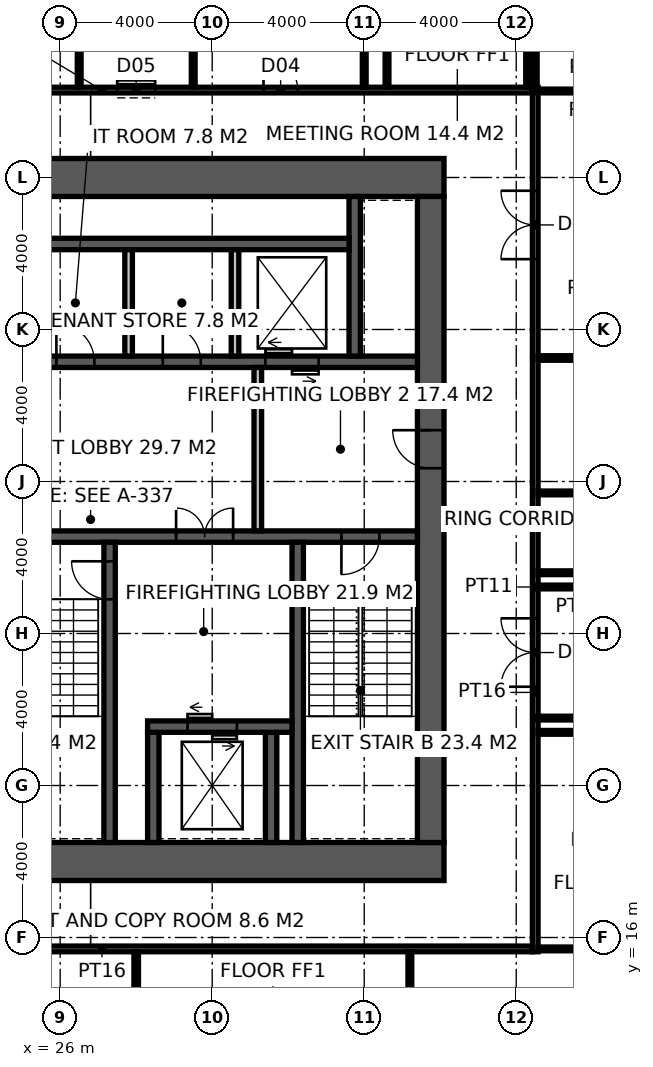
"""IFC4 building model, lengths in metres.
Left out: names, types, materials, properties, quantities, classifications, styles, units other than length and angle.
Written with IfcOpenShell. Run it as: python <this file> out.ifc"""

import sys

from ifc_helpers import new_model, si_unit, direction, frame, frame_2d, origin, place, context, subcontext, project, spatial, rectangle, extrude, element, fill, save


model = new_model("IFC4")
c1 = context("Model", 3, precision=1e-05, world=origin(), true_north=direction((0.0, 1.0)))
c2 = subcontext(c1, "Body", "Model", "MODEL_VIEW")
j1 = project(units=[si_unit("LENGTHUNIT", "METRE"), si_unit("PLANEANGLEUNIT", "RADIAN")], contexts=[c1])
p1 = place(None, origin())
s1 = spatial("IfcSite", under=j1, at=p1, CompositionType="ELEMENT")
p2 = place(p1, origin())
s2 = spatial("IfcBuilding", under=s1, at=p2, CompositionType="ELEMENT")
p3 = place(p2, frame((0.0, 0.0, 226.2)))
s3 = spatial("IfcBuildingStorey", under=s2, at=p3, CompositionType="ELEMENT", Elevation=226.2)
p4 = place(p3, frame((18.5, 18.0, -0.15), z_axis=(0.0, 0.0, 1.0), x_axis=(1.0, 0.0, 0.0)))
e1 = element("IfcWall", 1, at=p4, inside=s3, PredefinedType="SHEAR", context=c2, shape_type="SweptSolid", body=[
    extrude(rectangle(XDim=17.6, YDim=1.0, at=frame_2d((8.8, 0.0))), origin(), (0.0, 0.0, 1.0), 4.0),
])
p5 = place(p4, frame((3.45, 0.0, 0.15)))
e2 = element("IfcOpeningElement", 2, at=p5, cuts=e1, PredefinedType="OPENING", context=c2, shape_type="SweptSolid", body=[
    extrude(rectangle(XDim=1.5, YDim=2.4, at=frame_2d((0.75, 1.2))), frame((0.0, 0.51, 0.0), z_axis=(0.0, -1.0, 0.0), x_axis=(1.0, 0.0, 0.0)), (0.0, 0.0, 1.0), 1.02),
])
p6 = place(p3, frame((18.5, 36.0, -0.15), z_axis=(0.0, 0.0, 1.0), x_axis=(1.0, 0.0, 0.0)))
e3 = element("IfcWall", 3, at=p6, inside=s3, PredefinedType="SHEAR", context=c2, shape_type="SweptSolid", body=[
    extrude(rectangle(XDim=17.6, YDim=1.0, at=frame_2d((8.8, 0.0))), origin(), (0.0, 0.0, 1.0), 4.0),
])
p7 = place(p3, frame((35.75, 18.5, -0.15), z_axis=(0.0, 0.0, 1.0), x_axis=(0.0, 1.0, 0.0)))
e4 = element("IfcWall", 4, at=p7, inside=s3, PredefinedType="SHEAR", context=c2, shape_type="SweptSolid", body=[
    extrude(rectangle(XDim=17.0, YDim=0.7, at=frame_2d((8.5, 0.0))), origin(), (0.0, 0.0, 1.0), 4.0),
])
p8 = place(p7, frame((9.85, 0.0, 0.15)))
e5 = element("IfcOpeningElement", 5, at=p8, cuts=e4, PredefinedType="OPENING", context=c2, shape_type="SweptSolid", body=[
    extrude(rectangle(XDim=1.0, YDim=2.2, at=frame_2d((0.5, 1.1))), frame((0.0, 0.36, 0.0), z_axis=(0.0, -1.0, 0.0), x_axis=(1.0, 0.0, 0.0)), (0.0, 0.0, 1.0), 0.72),
])
p9 = place(p3, frame((24.15, 26.55, -0.15), z_axis=(0.0, 0.0, 1.0), x_axis=(1.0, 0.0, 0.0)))
e6 = element("IfcWall", 6, at=p9, inside=s3, PredefinedType="SHEAR", context=c2, shape_type="SweptSolid", body=[
    extrude(rectangle(XDim=11.25, YDim=0.3, at=frame_2d((5.625, 0.0))), origin(), (0.0, 0.0, 1.0), 4.0),
])
p10 = place(p9, frame((9.25, 0.0, 0.15)))
e7 = element("IfcOpeningElement", 7, at=p10, cuts=e6, PredefinedType="OPENING", context=c2, shape_type="SweptSolid", body=[
    extrude(rectangle(XDim=1.0, YDim=2.2, at=frame_2d((0.5, 1.1))), frame((0.0, 0.16, 0.0), z_axis=(0.0, -1.0, 0.0), x_axis=(1.0, 0.0, 0.0)), (0.0, 0.0, 1.0), 0.32),
])
p11 = place(p9, frame((4.9, 0.0, 0.15)))
e8 = element("IfcOpeningElement", 8, at=p11, cuts=e6, PredefinedType="OPENING", context=c2, shape_type="SweptSolid", body=[
    extrude(rectangle(XDim=1.5, YDim=2.4, at=frame_2d((0.75, 1.2))), frame((0.0, 0.16, 0.0), z_axis=(0.0, -1.0, 0.0), x_axis=(1.0, 0.0, 0.0)), (0.0, 0.0, 1.0), 0.32),
])
p12 = place(p3, frame((27.3, 18.5, -0.15), z_axis=(0.0, 0.0, 1.0), x_axis=(0.0, 1.0, 0.0)))
e9 = element("IfcWall", 9, at=p12, inside=s3, PredefinedType="SHEAR", context=c2, shape_type="SweptSolid", body=[
    extrude(rectangle(XDim=7.9, YDim=0.3, at=frame_2d((3.95, 0.0))), origin(), (0.0, 0.0, 1.0), 4.0),
])
p13 = place(p12, frame((6.4, 0.0, 0.15)))
e10 = element("IfcOpeningElement", 10, at=p13, cuts=e9, PredefinedType="OPENING", context=c2, shape_type="SweptSolid", body=[
    extrude(rectangle(XDim=1.0, YDim=2.2, at=frame_2d((0.5, 1.1))), frame((0.0, 0.16, 0.0), z_axis=(0.0, -1.0, 0.0), x_axis=(1.0, 0.0, 0.0)), (0.0, 0.0, 1.0), 0.32),
])
p14 = place(p3, frame((32.25, 18.5, -0.15), z_axis=(0.0, 0.0, 1.0), x_axis=(0.0, 1.0, 0.0)))
e11 = element("IfcWall", 11, at=p14, inside=s3, PredefinedType="SHEAR", context=c2, shape_type="SweptSolid", body=[
    extrude(rectangle(XDim=7.9, YDim=0.3, at=frame_2d((3.95, 0.0))), origin(), (0.0, 0.0, 1.0), 4.0),
])
for number, where, z_axis, x_axis in (
    (12, (28.45, 18.5, -0.15), (0.0, 0.0, 1.0), (0.0, 1.0, 0.0)),
    (13, (31.55, 18.5, -0.15), (0.0, 0.0, 1.0), (0.0, 1.0, 0.0)),
):
    element("IfcWall", number, at=place(p3, frame(where, z_axis=z_axis, x_axis=x_axis)), inside=s3, PredefinedType="SHEAR", context=c2, shape_type="SweptSolid", body=[
        extrude(rectangle(XDim=2.9, YDim=0.3, at=frame_2d((1.45, 0.0))), origin(), (0.0, 0.0, 1.0), 4.0),
    ])
p15 = place(p3, frame((28.3, 21.55, -0.15), z_axis=(0.0, 0.0, 1.0), x_axis=(1.0, 0.0, 0.0)))
e14 = element("IfcWall", 14, at=p15, inside=s3, PredefinedType="SHEAR", context=c2, shape_type="SweptSolid", body=[
    extrude(rectangle(XDim=3.8, YDim=0.3, at=frame_2d((1.9, 0.0))), origin(), (0.0, 0.0, 1.0), 4.0),
])
p16 = place(p15, frame((1.05, 0.0, 0.15)))
e15 = element("IfcOpeningElement", 15, at=p16, cuts=e14, PredefinedType="OPENING", context=c2, shape_type="SweptSolid", body=[
    extrude(rectangle(XDim=1.3, YDim=2.4, at=frame_2d((0.65, 1.2))), frame((0.0, 0.16, 0.0), z_axis=(0.0, -1.0, 0.0), x_axis=(1.0, 0.0, 0.0)), (0.0, 0.0, 1.0), 0.32),
])
p17 = place(p3, frame((24.15, 31.15, -0.15), z_axis=(0.0, 0.0, 1.0), x_axis=(1.0, 0.0, 0.0)))
e16 = element("IfcWall", 16, at=p17, inside=s3, PredefinedType="SHEAR", context=c2, shape_type="SweptSolid", body=[
    extrude(rectangle(XDim=11.25, YDim=0.3, at=frame_2d((5.625, 0.0))), origin(), (0.0, 0.0, 1.0), 4.0),
])
p18 = place(p17, frame((1.75, 0.0, 0.15)))
e17 = element("IfcOpeningElement", 17, at=p18, cuts=e16, PredefinedType="OPENING", context=c2, shape_type="SweptSolid", body=[
    extrude(rectangle(XDim=1.0, YDim=2.2, at=frame_2d((0.5, 1.1))), frame((0.0, 0.16, 0.0), z_axis=(0.0, -1.0, 0.0), x_axis=(1.0, 0.0, 0.0)), (0.0, 0.0, 1.0), 0.32),
])
p19 = place(p17, frame((4.55, 0.0, 0.15)))
e18 = element("IfcOpeningElement", 18, at=p19, cuts=e16, PredefinedType="OPENING", context=c2, shape_type="SweptSolid", body=[
    extrude(rectangle(XDim=1.0, YDim=2.2, at=frame_2d((0.5, 1.1))), frame((0.0, 0.16, 0.0), z_axis=(0.0, -1.0, 0.0), x_axis=(1.0, 0.0, 0.0)), (0.0, 0.0, 1.0), 0.32),
])
p20 = place(p17, frame((7.25, 0.0, 0.15)))
e19 = element("IfcOpeningElement", 19, at=p20, cuts=e16, PredefinedType="OPENING", context=c2, shape_type="SweptSolid", body=[
    extrude(rectangle(XDim=1.4, YDim=2.4, at=frame_2d((0.7, 1.2))), frame((0.0, 0.16, 0.0), z_axis=(0.0, -1.0, 0.0), x_axis=(1.0, 0.0, 0.0)), (0.0, 0.0, 1.0), 0.32),
])
p21 = place(p3, frame((33.75, 31.3, -0.15), z_axis=(0.0, 0.0, 1.0), x_axis=(0.0, 1.0, 0.0)))
e20 = element("IfcWall", 20, at=p21, inside=s3, PredefinedType="SHEAR", context=c2, shape_type="SweptSolid", body=[
    extrude(rectangle(XDim=4.2, YDim=0.3, at=frame_2d((2.1, 0.0))), origin(), (0.0, 0.0, 1.0), 4.0),
])
p22 = place(p3, frame((25.0, 34.25, -0.15), z_axis=(0.0, 0.0, 1.0), x_axis=(1.0, 0.0, 0.0)))
e21 = element("IfcWall", 21, at=p22, inside=s3, PredefinedType="SHEAR", context=c2, shape_type="SweptSolid", body=[
    extrude(rectangle(XDim=8.6, YDim=0.3, at=frame_2d((4.3, 0.0))), origin(), (0.0, 0.0, 1.0), 4.0),
])
p23 = place(p3, frame((27.8, 31.3, 0.0), z_axis=(0.0, 0.0, 1.0), x_axis=(0.0, 1.0, 0.0)))
e22 = element("IfcWall", 22, at=p23, inside=s3, PredefinedType="SOLIDWALL", context=c2, shape_type="SweptSolid", body=[
    extrude(rectangle(XDim=2.8, YDim=0.2, at=frame_2d((1.4, 0.0))), origin(), (0.0, 0.0, 1.0), 3.85),
])
p24 = place(p3, frame((30.6, 31.3, -0.15), z_axis=(0.0, 0.0, 1.0), x_axis=(0.0, 1.0, 0.0)))
e23 = element("IfcWall", 23, at=p24, inside=s3, PredefinedType="SOLIDWALL", context=c2, shape_type="SweptSolid", body=[
    extrude(rectangle(XDim=2.8, YDim=0.2, at=frame_2d((1.4, 0.0))), origin(), (0.0, 0.0, 1.0), 4.0),
])
p25 = place(p3, frame((31.2, 26.7, 0.0), z_axis=(0.0, 0.0, 1.0), x_axis=(0.0, 1.0, 0.0)))
e24 = element("IfcWall", 24, at=p25, inside=s3, PredefinedType="SOLIDWALL", context=c2, shape_type="SweptSolid", body=[
    extrude(rectangle(XDim=4.3, YDim=0.2, at=frame_2d((2.15, 0.0))), origin(), (0.0, 0.0, 1.0), 3.85),
])
p26 = place(p3, frame((38.5, 15.625, 0.0), z_axis=(0.0, 0.0, 1.0), x_axis=(0.0, 1.0, 0.0)))
e25 = element("IfcWall", 25, at=p26, inside=s3, PredefinedType="PARTITIONING", context=c2, shape_type="SweptSolid", body=[
    extrude(rectangle(XDim=22.75, YDim=0.15, at=frame_2d((11.375, 0.0))), origin(), (0.0, 0.0, 1.0), 3.85),
])
p27 = place(p26, frame((6.974, 0.0, 0.0)))
e26 = element("IfcOpeningElement", 26, at=p27, cuts=e25, PredefinedType="OPENING", context=c2, shape_type="SweptSolid", body=[
    extrude(rectangle(XDim=1.8, YDim=2.4, at=frame_2d((0.9, 1.2))), frame((0.0, 0.085, 0.0), z_axis=(0.0, -1.0, 0.0), x_axis=(1.0, 0.0, 0.0)), (0.0, 0.0, 1.0), 0.17),
])
p28 = place(p26, frame((18.226, 0.0, 0.0)))
e27 = element("IfcOpeningElement", 27, at=p28, cuts=e25, PredefinedType="OPENING", context=c2, shape_type="SweptSolid", body=[
    extrude(rectangle(XDim=1.8, YDim=2.4, at=frame_2d((0.9, 1.2))), frame((0.0, 0.085, 0.0), z_axis=(0.0, -1.0, 0.0), x_axis=(1.0, 0.0, 0.0)), (0.0, 0.0, 1.0), 0.17),
])
p29 = place(p3, frame((15.775, 15.7, 0.0), z_axis=(0.0, 0.0, 1.0), x_axis=(1.0, 0.0, 0.0)))
e28 = element("IfcWall", 28, at=p29, inside=s3, PredefinedType="PARTITIONING", context=c2, shape_type="SweptSolid", body=[
    extrude(rectangle(XDim=22.65, YDim=0.15, at=frame_2d((11.325, 0.0))), origin(), (0.0, 0.0, 1.0), 3.85),
])
p30 = place(p3, frame((15.775, 38.3, 0.0), z_axis=(0.0, 0.0, 1.0), x_axis=(1.0, 0.0, 0.0)))
e29 = element("IfcWall", 29, at=p30, inside=s3, PredefinedType="PARTITIONING", context=c2, shape_type="SweptSolid", body=[
    extrude(rectangle(XDim=22.65, YDim=0.15, at=frame_2d((11.325, 0.0))), origin(), (0.0, 0.0, 1.0), 3.85),
])
p31 = place(p30, frame((7.975, 0.0, 0.0)))
e30 = element("IfcOpeningElement", 30, at=p31, cuts=e29, PredefinedType="OPENING", context=c2, shape_type="SweptSolid", body=[
    extrude(rectangle(XDim=0.9, YDim=2.1, at=frame_2d((0.45, 1.05))), frame((0.0, 0.085, 0.0), z_axis=(0.0, -1.0, 0.0), x_axis=(1.0, 0.0, 0.0)), (0.0, 0.0, 1.0), 0.17),
])
p32 = place(p30, frame((11.725, 0.0, 0.0)))
e31 = element("IfcOpeningElement", 31, at=p32, cuts=e29, PredefinedType="OPENING", context=c2, shape_type="SweptSolid", body=[
    extrude(rectangle(XDim=1.0, YDim=2.1, at=frame_2d((0.5, 1.05))), frame((0.0, 0.085, 0.0), z_axis=(0.0, -1.0, 0.0), x_axis=(1.0, 0.0, 0.0)), (0.0, 0.0, 1.0), 0.17),
])
p33 = place(p30, frame((15.575, 0.0, 0.0)))
e32 = element("IfcOpeningElement", 32, at=p33, cuts=e29, PredefinedType="OPENING", context=c2, shape_type="SweptSolid", body=[
    extrude(rectangle(XDim=0.9, YDim=2.1, at=frame_2d((0.45, 1.05))), frame((0.0, 0.085, 0.0), z_axis=(0.0, -1.0, 0.0), x_axis=(1.0, 0.0, 0.0)), (0.0, 0.0, 1.0), 0.17),
])
p34 = place(p3, frame((34.0, 38.375, 0.0), z_axis=(0.0, 0.0, 1.0), x_axis=(0.0, 1.0, 0.0)))
e33 = element("IfcWall", 33, at=p34, inside=s3, PredefinedType="PARTITIONING", context=c2, shape_type="SweptSolid", body=[
    extrude(rectangle(XDim=3.675, YDim=0.1, at=frame_2d((1.837, 0.0))), origin(), (0.0, 0.0, 1.0), 2.95),
])
for number, where, z_axis, x_axis in (
    (34, (26.5, 38.375, 0.0), (0.0, 0.0, 1.0), (0.0, 1.0, 0.0)),
    (35, (29.5, 38.375, 0.0), (0.0, 0.0, 1.0), (0.0, 1.0, 0.0)),
):
    element("IfcWall", number, at=place(p3, frame(where, z_axis=z_axis, x_axis=x_axis)), inside=s3, PredefinedType="PARTITIONING", context=c2, shape_type="SweptSolid", body=[
        extrude(rectangle(XDim=3.575, YDim=0.1, at=frame_2d((1.788, 0.0))), origin(), (0.0, 0.0, 1.0), 3.85),
    ])
p35 = place(p3, frame((28.0, 8.3, 0.0), z_axis=(0.0, 0.0, 1.0), x_axis=(0.0, 1.0, 0.0)))
e36 = element("IfcWall", 36, at=p35, inside=s3, PredefinedType="PARTITIONING", context=c2, shape_type="SweptSolid", body=[
    extrude(rectangle(XDim=7.325, YDim=0.12, at=frame_2d((3.663, 0.0))), origin(), (0.0, 0.0, 1.0), 3.85),
])
p36 = place(p3, frame((38.575, 31.25, 0.0), z_axis=(0.0, 0.0, 1.0), x_axis=(1.0, 0.0, 0.0)))
e37 = element("IfcWall", 37, at=p36, inside=s3, PredefinedType="PARTITIONING", context=c2, shape_type="SweptSolid", body=[
    extrude(rectangle(XDim=11.125, YDim=0.12, at=frame_2d((5.562, 0.0))), origin(), (0.0, 0.0, 1.0), 3.85),
])
for number, where, z_axis, x_axis in (
    (38, (38.575, 15.7, 0.0), (0.0, 0.0, 1.0), (1.0, 0.0, 0.0)),
    (39, (38.575, 21.399, 0.0), (0.0, 0.0, 1.0), (1.0, 0.0, 0.0)),
    (40, (38.575, 25.599, 0.0), (0.0, 0.0, 1.0), (1.0, 0.0, 0.0)),
    (41, (38.575, 27.699, 0.0), (0.0, 0.0, 1.0), (1.0, 0.0, 0.0)),
):
    element("IfcWall", number, at=place(p3, frame(where, z_axis=z_axis, x_axis=x_axis)), inside=s3, PredefinedType="PARTITIONING", context=c2, shape_type="SweptSolid", body=[
        extrude(rectangle(XDim=5.975, YDim=0.1, at=frame_2d((2.988, 0.0))), origin(), (0.0, 0.0, 1.0), 3.85),
    ])
p37 = place(p3, frame((34.6, 38.375, 0.0), z_axis=(0.0, 0.0, 1.0), x_axis=(0.0, 1.0, 0.0)))
e42 = element("IfcWall", 42, at=p37, inside=s3, PredefinedType="PARTITIONING", context=c2, shape_type="SweptSolid", body=[
    extrude(rectangle(XDim=4.075, YDim=0.1, at=frame_2d((2.038, 0.0))), origin(), (0.0, 0.0, 1.0), 3.85),
])
p38 = place(p3, frame((35.201, 12.15, 0.0), z_axis=(0.0, 0.0, 1.0), x_axis=(0.0, 1.0, 0.0)))
e43 = element("IfcWall", 43, at=p38, inside=s3, PredefinedType="PARTITIONING", context=c2, shape_type="SweptSolid", body=[
    extrude(rectangle(XDim=3.475, YDim=0.1, at=frame_2d((1.738, 0.0))), origin(), (0.0, 0.0, 1.0), 3.85),
])
p39 = place(p3, frame((38.3, 38.375, 0.0), z_axis=(0.0, 0.0, 1.0), x_axis=(0.0, 1.0, 0.0)))
e44 = element("IfcWall", 44, at=p39, inside=s3, PredefinedType="PARTITIONING", context=c2, shape_type="SweptSolid", body=[
    extrude(rectangle(XDim=4.075, YDim=0.1, at=frame_2d((2.038, 0.0))), origin(), (0.0, 0.0, 1.0), 2.95),
])
for number, where, z_axis, x_axis in (
    (45, (38.5, 21.774, 0.0), (0.0, 0.0, 1.0), (1.0, 0.0, 0.0)),
    (46, (41.65, 25.224, 0.0), (0.0, 0.0, 1.0), (-1.0, 0.0, 0.0)),
):
    element("IfcWall", number, at=place(p3, frame(where, z_axis=z_axis, x_axis=x_axis)), inside=s3, PredefinedType="PARTITIONING", context=c2, shape_type="SweptSolid", body=[
        extrude(rectangle(XDim=3.15, YDim=0.1, at=frame_2d((1.575, 0.0))), origin(), (0.0, 0.0, 1.0), 3.85),
    ])
p40 = place(p3, frame((38.5, 38.276, 0.0), z_axis=(0.0, 0.0, 1.0), x_axis=(1.0, 0.0, 0.0)))
e47 = element("IfcWall", 47, at=p40, inside=s3, PredefinedType="PARTITIONING", context=c2, shape_type="SweptSolid", body=[
    extrude(rectangle(XDim=3.05, YDim=0.1, at=frame_2d((1.525, 0.0))), origin(), (0.0, 0.0, 1.0), 3.85),
])
p41 = place(p3, frame((38.5, 43.826, 0.0), z_axis=(0.0, 0.0, 1.0), x_axis=(0.0, -1.0, 0.0)))
e48 = element("IfcWall", 48, at=p41, inside=s3, PredefinedType="PARTITIONING", context=c2, shape_type="SweptSolid", body=[
    extrude(rectangle(XDim=5.526, YDim=0.1, at=frame_2d((2.763, 0.0))), origin(), (0.0, 0.0, 1.0), 3.85),
])
p42 = place(p13, origin())
e49 = element("IfcDoor", 49, at=p42, inside=s3, OperationType="SINGLE_SWING_RIGHT", PredefinedType="DOOR", context=c2, shape_type="SweptSolid", body=[
    extrude(rectangle(XDim=1.0, YDim=2.2, at=frame_2d((0.5, 1.1))), frame((0.0, 0.025, 0.0), z_axis=(0.0, -1.0, 0.0), x_axis=(1.0, 0.0, 0.0)), (0.0, 0.0, 1.0), 0.05),
])
fill(e10, e49)
p43 = place(p10, frame((1.0, 0.0, 0.0), z_axis=(0.0, 0.0, 1.0), x_axis=(-1.0, 0.0, 0.0)))
e50 = element("IfcDoor", 50, at=p43, inside=s3, OperationType="SINGLE_SWING_RIGHT", PredefinedType="DOOR", context=c2, shape_type="SweptSolid", body=[
    extrude(rectangle(XDim=1.0, YDim=2.2, at=frame_2d((0.5, 1.1))), frame((0.0, 0.025, 0.0), z_axis=(0.0, -1.0, 0.0), x_axis=(1.0, 0.0, 0.0)), (0.0, 0.0, 1.0), 0.05),
])
fill(e7, e50)
p44 = place(p8, origin())
e51 = element("IfcDoor", 51, at=p44, inside=s3, OperationType="SINGLE_SWING_RIGHT", PredefinedType="DOOR", context=c2, shape_type="SweptSolid", body=[
    extrude(rectangle(XDim=1.0, YDim=2.2, at=frame_2d((0.5, 1.1))), frame((0.0, 0.025, 0.0), z_axis=(0.0, -1.0, 0.0), x_axis=(1.0, 0.0, 0.0)), (0.0, 0.0, 1.0), 0.05),
])
fill(e5, e51)
p45 = place(p11, origin())
e52 = element("IfcDoor", 52, at=p45, inside=s3, OperationType="DOUBLE_DOOR_DOUBLE_SWING", PredefinedType="DOOR", context=c2, shape_type="SweptSolid", body=[
    extrude(rectangle(XDim=1.5, YDim=2.4, at=frame_2d((0.75, 1.2))), frame((0.0, 0.025, 0.0), z_axis=(0.0, -1.0, 0.0), x_axis=(1.0, 0.0, 0.0)), (0.0, 0.0, 1.0), 0.05),
])
fill(e8, e52)
p46 = place(p18, origin())
e53 = element("IfcDoor", 53, at=p46, inside=s3, OperationType="SINGLE_SWING_LEFT", PredefinedType="DOOR", context=c2, shape_type="SweptSolid", body=[
    extrude(rectangle(XDim=1.0, YDim=2.2, at=frame_2d((0.5, 1.1))), frame((0.0, 0.025, 0.0), z_axis=(0.0, -1.0, 0.0), x_axis=(1.0, 0.0, 0.0)), (0.0, 0.0, 1.0), 0.05),
])
fill(e17, e53)
p47 = place(p19, origin())
e54 = element("IfcDoor", 54, at=p47, inside=s3, OperationType="SINGLE_SWING_LEFT", PredefinedType="DOOR", context=c2, shape_type="SweptSolid", body=[
    extrude(rectangle(XDim=1.0, YDim=2.2, at=frame_2d((0.5, 1.1))), frame((0.0, 0.025, 0.0), z_axis=(0.0, -1.0, 0.0), x_axis=(1.0, 0.0, 0.0)), (0.0, 0.0, 1.0), 0.05),
])
fill(e18, e54)
p48 = place(p32, origin())
e55 = element("IfcDoor", 55, at=p48, inside=s3, OperationType="SLIDING_TO_LEFT", PredefinedType="DOOR", context=c2, shape_type="SweptSolid", body=[
    extrude(rectangle(XDim=1.0, YDim=2.1, at=frame_2d((0.5, 1.05))), frame((0.0, 0.025, 0.0), z_axis=(0.0, -1.0, 0.0), x_axis=(1.0, 0.0, 0.0)), (0.0, 0.0, 1.0), 0.05),
])
fill(e31, e55)
p49 = place(p33, origin())
e56 = element("IfcDoor", 56, at=p49, inside=s3, OperationType="SINGLE_SWING_LEFT", PredefinedType="DOOR", context=c2, shape_type="SweptSolid", body=[
    extrude(rectangle(XDim=0.9, YDim=2.1, at=frame_2d((0.45, 1.05))), frame((0.0, 0.025, 0.0), z_axis=(0.0, -1.0, 0.0), x_axis=(1.0, 0.0, 0.0)), (0.0, 0.0, 1.0), 0.05),
])
fill(e32, e56)
p50 = place(p27, origin())
e57 = element("IfcDoor", 57, at=p50, inside=s3, OperationType="DOUBLE_DOOR_DOUBLE_SWING", PredefinedType="DOOR", context=c2, shape_type="SweptSolid", body=[
    extrude(rectangle(XDim=1.8, YDim=2.4, at=frame_2d((0.9, 1.2))), frame((0.0, 0.025, 0.0), z_axis=(0.0, -1.0, 0.0), x_axis=(1.0, 0.0, 0.0)), (0.0, 0.0, 1.0), 0.05),
])
fill(e26, e57)
p51 = place(p28, origin())
e58 = element("IfcDoor", 58, at=p51, inside=s3, OperationType="DOUBLE_DOOR_DOUBLE_SWING", PredefinedType="DOOR", context=c2, shape_type="SweptSolid", body=[
    extrude(rectangle(XDim=1.8, YDim=2.4, at=frame_2d((0.9, 1.2))), frame((0.0, 0.025, 0.0), z_axis=(0.0, -1.0, 0.0), x_axis=(1.0, 0.0, 0.0)), (0.0, 0.0, 1.0), 0.05),
])
fill(e27, e58)
p52 = place(p16, origin())
e59 = element("IfcDoor", 59, at=p52, inside=s3, OperationType="DOUBLE_DOOR_SLIDING", PredefinedType="DOOR", context=c2, shape_type="SweptSolid", body=[
    extrude(rectangle(XDim=1.3, YDim=2.4, at=frame_2d((0.65, 1.2))), frame((0.0, 0.025, 0.0), z_axis=(0.0, -1.0, 0.0), x_axis=(1.0, 0.0, 0.0)), (0.0, 0.0, 1.0), 0.05),
])
fill(e15, e59)
p53 = place(p20, origin())
e60 = element("IfcDoor", 60, at=p53, inside=s3, OperationType="DOUBLE_DOOR_SLIDING", PredefinedType="DOOR", context=c2, shape_type="SweptSolid", body=[
    extrude(rectangle(XDim=1.4, YDim=2.4, at=frame_2d((0.7, 1.2))), frame((0.0, 0.025, 0.0), z_axis=(0.0, -1.0, 0.0), x_axis=(1.0, 0.0, 0.0)), (0.0, 0.0, 1.0), 0.05),
])
fill(e19, e60)
save(model, sys.argv[1])
